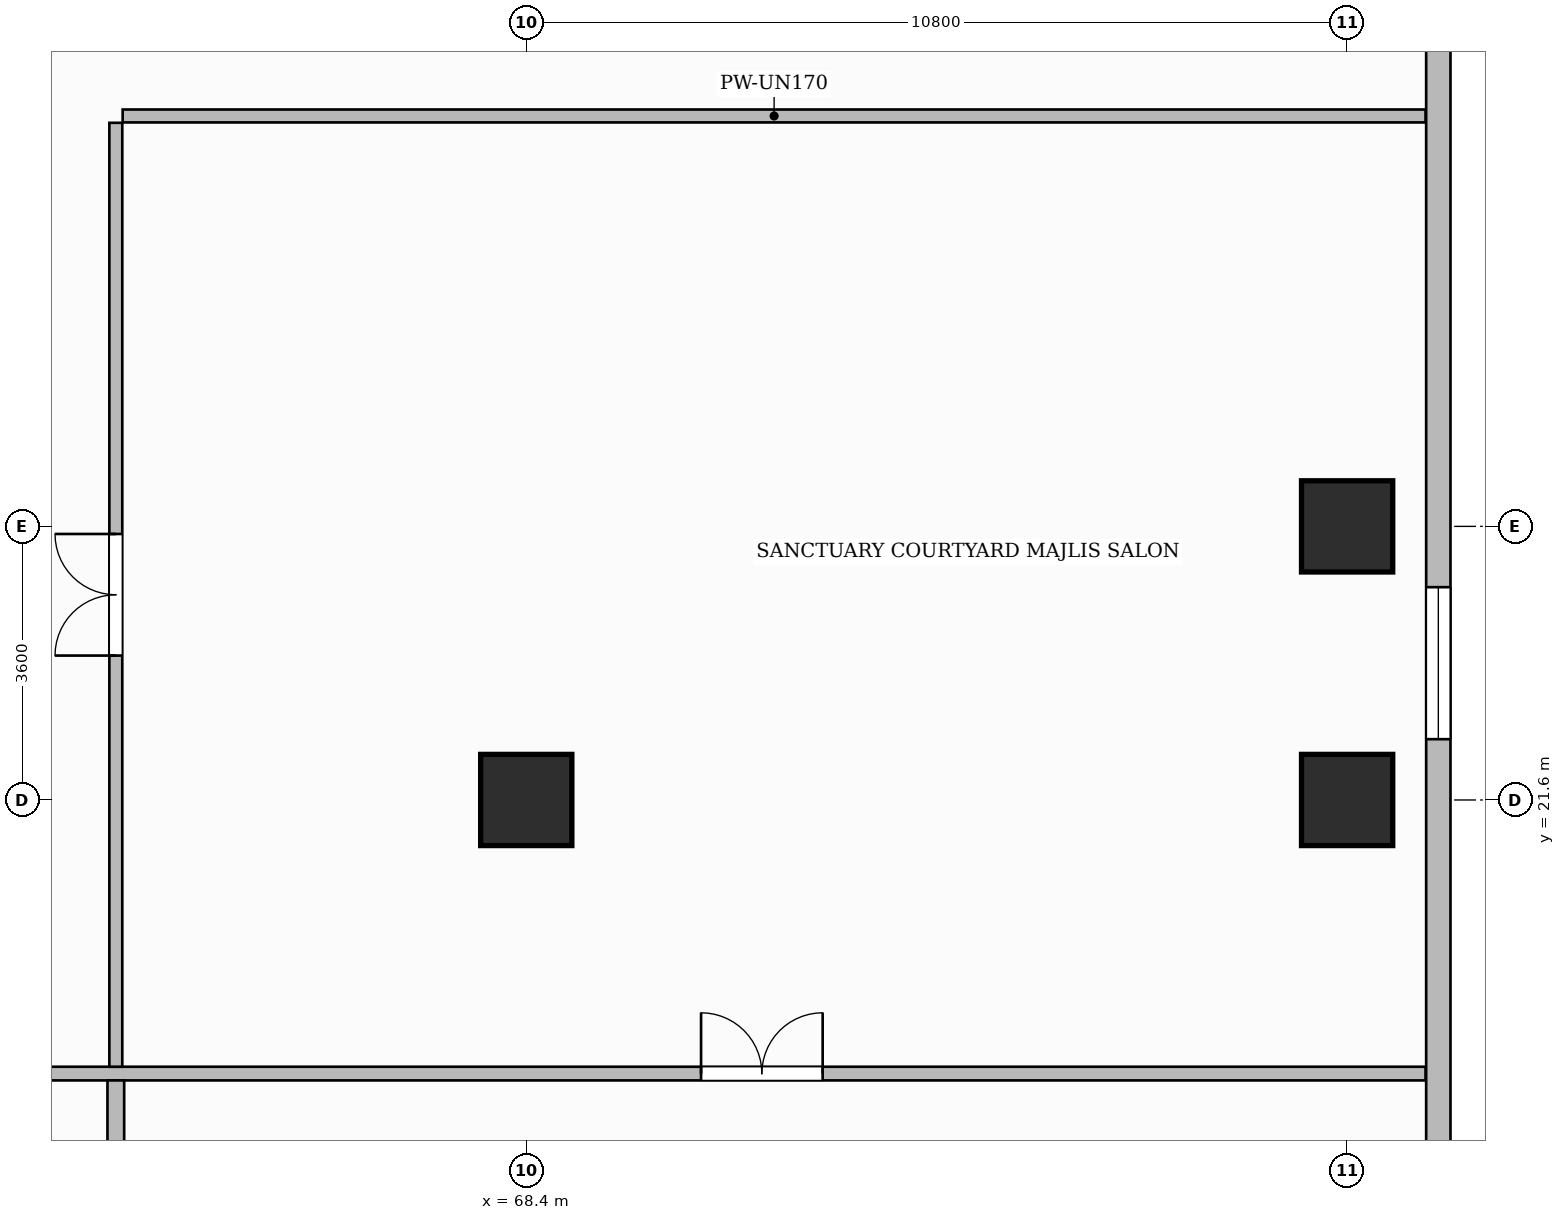
"""IFC4 building model, lengths in metres.
Left out: names, types, materials, properties, quantities, classifications, styles, units other than length and angle.
Written with IfcOpenShell. Run it as: python <this file> out.ifc"""

import sys

from ifc_helpers import new_model, si_unit, direction, frame, frame_2d, origin, origin_2d, place, context, subcontext, project, spatial, rectangle, extrude, source, transform, mapped, element, fill, save


model = new_model("IFC4")
c1 = context("Model", 3, precision=1e-05, world=origin(), true_north=direction((0.0, 1.0)))
c2 = subcontext(c1, "Body", "Model", "MODEL_VIEW")
j1 = project(units=[si_unit("LENGTHUNIT", "METRE"), si_unit("PLANEANGLEUNIT", "RADIAN")], contexts=[c1])
p1 = place(None, origin())
s1 = spatial("IfcSite", under=j1, at=p1, CompositionType="ELEMENT")
p2 = place(p1, origin())
s2 = spatial("IfcBuilding", under=s1, at=p2, CompositionType="ELEMENT")
p3 = place(p2, frame((0.0, 0.0, 21.6)))
s3 = spatial("IfcBuildingStorey", under=s2, at=p3, CompositionType="ELEMENT", Elevation=21.6)
m1 = source(origin(), c2, "Body", "SweptSolid", [
    extrude(rectangle(XDim=1.2, YDim=1.2, at=origin_2d()), origin(), (0.0, 0.0, 1.0), 5.4),
])
for number, where, z_axis, x_axis in (
    (1, (68.4, 21.6, 0.0), (0.0, 0.0, 1.0), (1.0, 0.0, 0.0)),
    (2, (79.2, 21.6, 0.0), (0.0, 0.0, 1.0), (1.0, 0.0, 0.0)),
    (3, (79.2, 25.2, 0.0), (0.0, 0.0, 1.0), (1.0, 0.0, 0.0)),
):
    element("IfcColumn", number, at=place(p3, frame(where, z_axis=z_axis, x_axis=x_axis)), inside=s3, PredefinedType="COLUMN", context=c2, shape_type="MappedRepresentation", body=[
        mapped(m1, transform((0.0, 0.0, 0.0), scale=1.0)),
    ])
p4 = place(p3, frame((49.89, 18.0, 0.0), z_axis=(0.0, 0.0, 1.0), x_axis=(1.0, 0.0, 0.0)))
e4 = element("IfcWall", 4, at=p4, inside=s3, PredefinedType="PARTITIONING", context=c2, shape_type="SweptSolid", body=[
    extrude(rectangle(XDim=30.342, YDim=0.18, at=frame_2d((15.171, 0.0))), origin(), (0.0, 0.0, 1.0), 5.1),
])
p5 = place(p4, frame((4.51, 0.0, 0.0)))
e5 = element("IfcOpeningElement", 5, at=p5, cuts=e4, PredefinedType="OPENING", context=c2, shape_type="SweptSolid", body=[
    extrude(rectangle(XDim=1.6, YDim=2.4, at=frame_2d((0.8, 1.2))), frame((0.0, 0.1, 0.0), z_axis=(0.0, -1.0, 0.0), x_axis=(1.0, 0.0, 0.0)), (0.0, 0.0, 1.0), 0.2),
])
p6 = place(p4, frame((20.81, 0.0, 0.0)))
e6 = element("IfcOpeningElement", 6, at=p6, cuts=e4, PredefinedType="OPENING", context=c2, shape_type="SweptSolid", body=[
    extrude(rectangle(XDim=1.6, YDim=2.4, at=frame_2d((0.8, 1.2))), frame((0.0, 0.1, 0.0), z_axis=(0.0, -1.0, 0.0), x_axis=(1.0, 0.0, 0.0)), (0.0, 0.0, 1.0), 0.2),
])
p7 = place(p3, frame((63.0, 0.168, 0.0), z_axis=(0.0, 0.0, 1.0), x_axis=(0.0, 1.0, 0.0)))
e7 = element("IfcWall", 7, at=p7, inside=s3, PredefinedType="PARTITIONING", context=c2, shape_type="SweptSolid", body=[
    extrude(rectangle(XDim=17.742, YDim=0.22, at=frame_2d((8.871, 0.0))), origin(), (0.0, 0.0, 1.0), 5.1),
])
p8 = place(p7, frame((8.032, 0.0, 0.0)))
e8 = element("IfcOpeningElement", 8, at=p8, cuts=e7, PredefinedType="OPENING", context=c2, shape_type="SweptSolid", body=[
    extrude(rectangle(XDim=1.6, YDim=2.4, at=frame_2d((0.8, 1.2))), frame((0.0, 0.12, 0.0), z_axis=(0.0, -1.0, 0.0), x_axis=(1.0, 0.0, 0.0)), (0.0, 0.0, 1.0), 0.24),
])
p9 = place(p3, frame((63.0, 18.09, 0.0), z_axis=(0.0, 0.0, 1.0), x_axis=(0.0, 1.0, 0.0)))
e9 = element("IfcWall", 9, at=p9, inside=s3, PredefinedType="PARTITIONING", context=c2, shape_type="SweptSolid", body=[
    extrude(rectangle(XDim=12.42, YDim=0.17, at=frame_2d((6.21, 0.0))), origin(), (0.0, 0.0, 1.0), 5.1),
])
p10 = place(p9, frame((5.41, 0.0, 0.0)))
e10 = element("IfcOpeningElement", 10, at=p10, cuts=e9, PredefinedType="OPENING", context=c2, shape_type="SweptSolid", body=[
    extrude(rectangle(XDim=1.6, YDim=2.4, at=frame_2d((0.8, 1.2))), frame((0.0, 0.095, 0.0), z_axis=(0.0, -1.0, 0.0), x_axis=(1.0, 0.0, 0.0)), (0.0, 0.0, 1.0), 0.19),
])
p11 = place(p3, frame((63.09, 30.6, 0.0), z_axis=(0.0, 0.0, 1.0), x_axis=(1.0, 0.0, 0.0)))
e11 = element("IfcWall", 11, at=p11, inside=s3, PredefinedType="PARTITIONING", context=c2, shape_type="SweptSolid", body=[
    extrude(rectangle(XDim=17.142, YDim=0.17, at=frame_2d((8.571, 0.0))), origin(), (0.0, 0.0, 1.0), 5.1),
])
p12 = place(p3, frame((80.4, 0.05, 0.0), z_axis=(0.0, 0.0, 1.0), x_axis=(0.0, 1.0, 0.0)))
e12 = element("IfcWall", 12, at=p12, inside=s3, PredefinedType="SOLIDWALL", context=c2, shape_type="SweptSolid", body=[
    extrude(rectangle(XDim=46.7, YDim=0.32, at=frame_2d((23.35, 0.0))), origin(), (0.0, 0.0, 1.0), 5.1),
])
p13 = place(p12, frame((22.35, 0.0, 0.75)))
e13 = element("IfcOpeningElement", 13, at=p13, cuts=e12, PredefinedType="OPENING", context=c2, shape_type="SweptSolid", body=[
    extrude(rectangle(XDim=2.0, YDim=2.6, at=frame_2d((1.0, 1.3))), frame((0.0, 0.17, 0.0), z_axis=(0.0, -1.0, 0.0), x_axis=(1.0, 0.0, 0.0)), (0.0, 0.0, 1.0), 0.34),
])
m2 = source(origin(), c2, "Body", "SweptSolid", [
    extrude(rectangle(XDim=1.6, YDim=2.4, at=frame_2d((0.8, 1.2))), frame((0.0, 0.025, 0.0), z_axis=(0.0, -1.0, 0.0), x_axis=(1.0, 0.0, 0.0)), (0.0, 0.0, 1.0), 0.05),
])
p14 = place(p6, origin())
e14 = element("IfcDoor", 14, at=p14, inside=s3, OperationType="DOUBLE_DOOR_SINGLE_SWING", PredefinedType="DOOR", context=c2, shape_type="MappedRepresentation", body=[
    mapped(m2, transform((0.0, 0.0, 0.0), scale=1.0)),
])
fill(e6, e14)
p15 = place(p10, origin())
e15 = element("IfcDoor", 15, at=p15, inside=s3, OperationType="DOUBLE_DOOR_SINGLE_SWING", PredefinedType="DOOR", context=c2, shape_type="MappedRepresentation", body=[
    mapped(m2, transform((0.0, 0.0, 0.0), scale=1.0)),
])
fill(e10, e15)
m3 = source(origin(), c2, "Body", "SweptSolid", [
    extrude(rectangle(XDim=2.0, YDim=2.6, at=frame_2d((1.0, 1.3))), frame((0.0, 0.03, 0.0), z_axis=(0.0, -1.0, 0.0), x_axis=(1.0, 0.0, 0.0)), (0.0, 0.0, 1.0), 0.06),
])
p16 = place(p13, origin())
e16 = element("IfcWindow", 16, at=p16, inside=s3, PartitioningType="DOUBLE_PANEL_VERTICAL", PredefinedType="WINDOW", context=c2, shape_type="MappedRepresentation", body=[
    mapped(m3, transform((0.0, 0.0, 0.0), scale=1.0)),
])
fill(e13, e16)
save(model, sys.argv[1])
